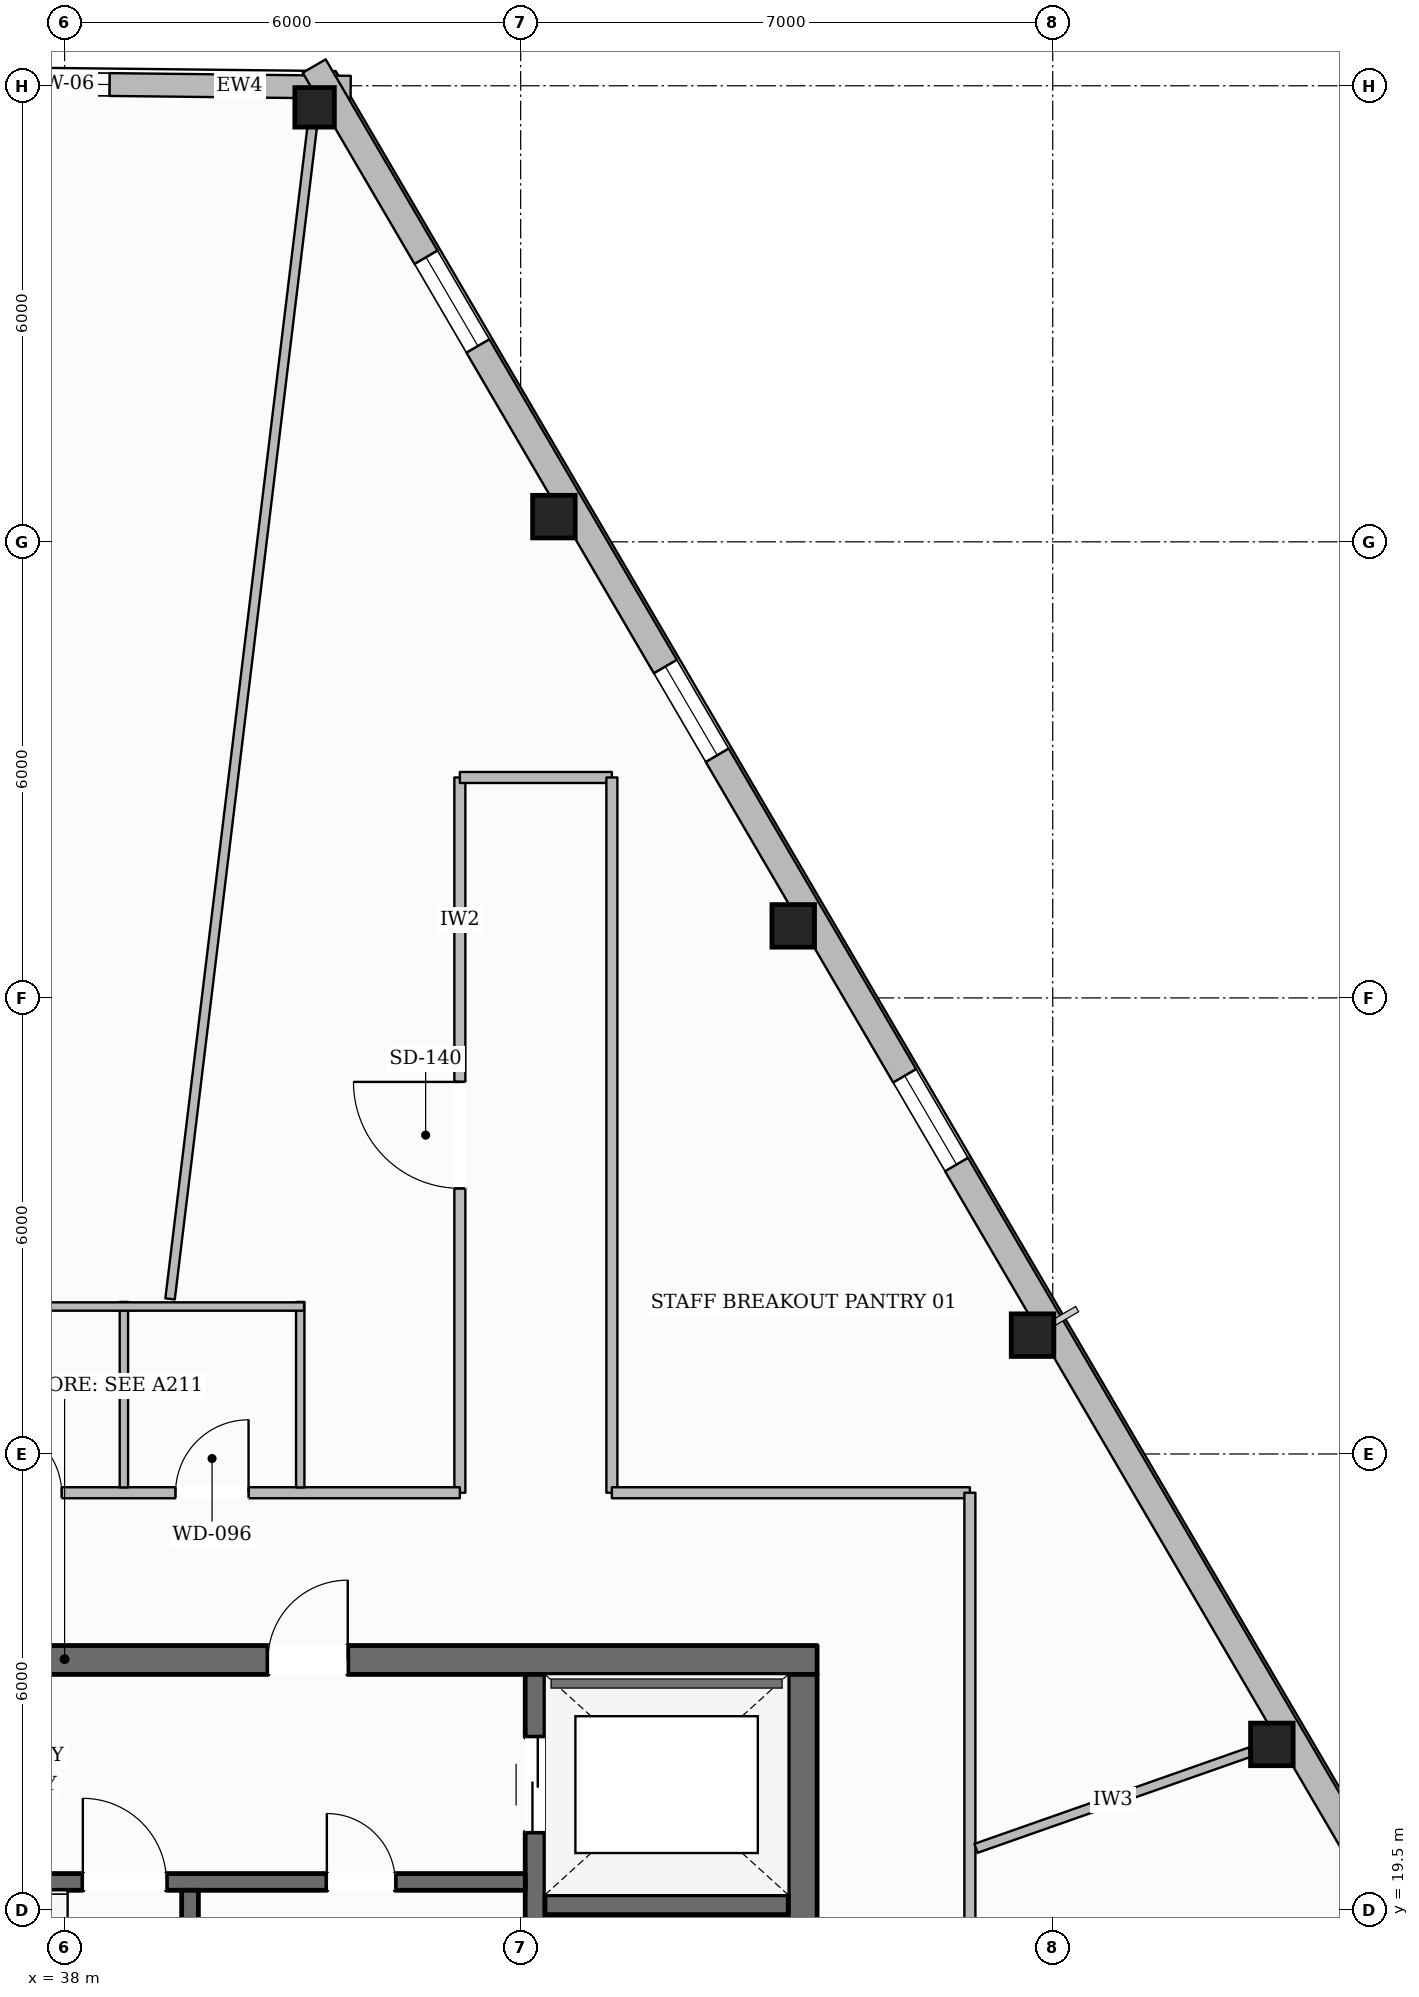
"""IFC4 building model, lengths in metres.
Left out: names, types, materials, properties, quantities, classifications, styles, units other than length and angle.
Written with IfcOpenShell. Run it as: python <this file> out.ifc"""

import sys

from ifc_helpers import new_model, si_unit, direction, frame, frame_2d, origin, origin_2d, place, context, subcontext, project, spatial, rectangle, hollow_rectangle, extrude, element, fill, save


model = new_model("IFC4")
c1 = context("Model", 3, precision=1e-05, world=origin(), true_north=direction((0.0, 1.0)))
c2 = subcontext(c1, "Body", "Model", "MODEL_VIEW")
j1 = project(units=[si_unit("LENGTHUNIT", "METRE"), si_unit("PLANEANGLEUNIT", "RADIAN")], contexts=[c1])
p1 = place(None, origin())
s1 = spatial("IfcSite", under=j1, at=p1, CompositionType="ELEMENT")
p2 = place(p1, origin())
s2 = spatial("IfcBuilding", under=s1, at=p2, CompositionType="ELEMENT")
p3 = place(p2, frame((0.0, 0.0, 254.9)))
s3 = spatial("IfcBuildingStorey", under=s2, at=p3, CompositionType="ELEMENT", Elevation=254.9)
p4 = place(p3, frame((28.1, 22.79, 0.0), z_axis=(0.0, 0.0, 1.0), x_axis=(1.0, 0.0, 0.0)))
e1 = element("IfcWall", 1, at=p4, inside=s3, PredefinedType="SOLIDWALL", context=c2, shape_type="SweptSolid", body=[
    extrude(rectangle(XDim=19.8, YDim=0.38, at=frame_2d((9.9, 0.0))), origin(), (0.0, 0.0, 1.0), 3.61),
])
p5 = place(p4, frame((6.175, 0.0, 0.0)))
e2 = element("IfcOpeningElement", 2, at=p5, cuts=e1, PredefinedType="OPENING", context=c2, shape_type="SweptSolid", body=[
    extrude(rectangle(XDim=1.05, YDim=2.15, at=frame_2d((0.525, 1.075))), frame((0.0, 0.2, 0.0), z_axis=(0.0, -1.0, 0.0), x_axis=(1.0, 0.0, 0.0)), (0.0, 0.0, 1.0), 0.4),
])
p6 = place(p4, frame((12.575, 0.0, 0.0)))
e3 = element("IfcOpeningElement", 3, at=p6, cuts=e1, PredefinedType="OPENING", context=c2, shape_type="SweptSolid", body=[
    extrude(rectangle(XDim=1.05, YDim=2.15, at=frame_2d((0.525, 1.075))), frame((0.0, 0.2, 0.0), z_axis=(0.0, -1.0, 0.0), x_axis=(1.0, 0.0, 0.0)), (0.0, 0.0, 1.0), 0.4),
])
p7 = place(p3, frame((47.71, 9.6, 0.0), z_axis=(0.0, 0.0, 1.0), x_axis=(0.0, 1.0, 0.0)))
e4 = element("IfcWall", 4, at=p7, inside=s3, PredefinedType="SOLIDWALL", context=c2, shape_type="SweptSolid", body=[
    extrude(rectangle(XDim=13.0, YDim=0.38, at=frame_2d((6.5, 0.0))), origin(), (0.0, 0.0, 1.0), 3.61),
])
p8 = place(p7, frame((0.2, 0.0, 0.0)))
e5 = element("IfcOpeningElement", 5, at=p8, cuts=e4, PredefinedType="OPENING", context=c2, shape_type="SweptSolid", body=[
    extrude(rectangle(XDim=1.1, YDim=2.15, at=frame_2d((0.55, 1.075))), frame((0.0, 0.2, 0.0), z_axis=(0.0, -1.0, 0.0), x_axis=(1.0, 0.0, 0.0)), (0.0, 0.0, 1.0), 0.4),
])
p9 = place(p7, frame((8.4, 0.0, 0.0)))
e6 = element("IfcOpeningElement", 6, at=p9, cuts=e4, PredefinedType="OPENING", context=c2, shape_type="SweptSolid", body=[
    extrude(rectangle(XDim=0.9, YDim=2.1, at=frame_2d((0.45, 1.05))), frame((0.0, 0.2, 0.0), z_axis=(0.0, -1.0, 0.0), x_axis=(1.0, 0.0, 0.0)), (0.0, 0.0, 1.0), 0.4),
])
p10 = place(p3, frame((44.19, 9.6, 0.0), z_axis=(0.0, 0.0, 1.0), x_axis=(0.0, 1.0, 0.0)))
e7 = element("IfcWall", 7, at=p10, inside=s3, PredefinedType="SHEAR", context=c2, shape_type="SweptSolid", body=[
    extrude(rectangle(XDim=13.0, YDim=0.26, at=frame_2d((6.5, 0.0))), origin(), (0.0, 0.0, 1.0), 3.61),
])
p11 = place(p10, frame((10.925, 0.0, 0.0)))
e8 = element("IfcOpeningElement", 8, at=p11, cuts=e7, PredefinedType="OPENING", context=c2, shape_type="SweptSolid", body=[
    extrude(rectangle(XDim=1.25, YDim=2.25, at=frame_2d((0.625, 1.125))), frame((0.0, 0.14, 0.0), z_axis=(0.0, -1.0, 0.0), x_axis=(1.0, 0.0, 0.0)), (0.0, 0.0, 1.0), 0.28),
])
p12 = place(p3, frame((44.32, 19.57, 0.0), z_axis=(0.0, 0.0, 1.0), x_axis=(1.0, 0.0, 0.0)))
e9 = element("IfcWall", 9, at=p12, inside=s3, PredefinedType="SHEAR", context=c2, shape_type="SweptSolid", body=[
    extrude(rectangle(XDim=3.2, YDim=0.26, at=frame_2d((1.6, 0.0))), origin(), (0.0, 0.0, 1.0), 3.61),
])
p13 = place(p3, frame((31.94, 19.87, 0.0), z_axis=(0.0, 0.0, 1.0), x_axis=(1.0, 0.0, 0.0)))
e10 = element("IfcWall", 10, at=p13, inside=s3, PredefinedType="SOLIDWALL", context=c2, shape_type="SweptSolid", body=[
    extrude(rectangle(XDim=12.12, YDim=0.22, at=frame_2d((6.06, 0.0))), origin(), (0.0, 0.0, 1.0), 3.61),
])
p14 = place(p13, frame((6.3, 0.0, 0.0)))
e11 = element("IfcOpeningElement", 11, at=p14, cuts=e10, PredefinedType="OPENING", context=c2, shape_type="SweptSolid", body=[
    extrude(rectangle(XDim=1.1, YDim=2.15, at=frame_2d((0.55, 1.075))), frame((0.0, 0.12, 0.0), z_axis=(0.0, -1.0, 0.0), x_axis=(1.0, 0.0, 0.0)), (0.0, 0.0, 1.0), 0.24),
])
p15 = place(p13, frame((9.51, 0.0, 0.0)))
e12 = element("IfcOpeningElement", 12, at=p15, cuts=e10, PredefinedType="OPENING", context=c2, shape_type="SweptSolid", body=[
    extrude(rectangle(XDim=0.9, YDim=2.1, at=frame_2d((0.45, 1.05))), frame((0.0, 0.12, 0.0), z_axis=(0.0, -1.0, 0.0), x_axis=(1.0, 0.0, 0.0)), (0.0, 0.0, 1.0), 0.24),
])
p16 = place(p3, frame((39.65, 16.56, 0.0), z_axis=(0.0, 0.0, 1.0), x_axis=(0.0, 1.0, 0.0)))
e13 = element("IfcWall", 13, at=p16, inside=s3, PredefinedType="SOLIDWALL", context=c2, shape_type="SweptSolid", body=[
    extrude(rectangle(XDim=3.2, YDim=0.22, at=frame_2d((1.6, 0.0))), origin(), (0.0, 0.0, 1.0), 3.61),
])
for number, where, z_axis, x_axis in (
    (14, (53.883, 21.679, 0.0), (0.0, 0.0, 1.0), (1.0, 0.0, 0.0)),
    (15, (50.734, 27.063, 0.0), (0.0, 0.0, 1.0), (1.0, 0.0, 0.0)),
    (16, (47.586, 32.448, 0.0), (0.0, 0.0, 1.0), (1.0, 0.0, 0.0)),
    (17, (44.437, 37.832, 0.0), (0.0, 0.0, 1.0), (1.0, 0.0, 0.0)),
):
    element("IfcColumn", number, at=place(p3, frame(where, z_axis=z_axis, x_axis=x_axis)), inside=s3, PredefinedType="COLUMN", context=c2, shape_type="SweptSolid", body=[
        extrude(hollow_rectangle(XDim=0.56, YDim=0.56, WallThickness=0.025, at=origin_2d()), origin(), (0.0, 0.0, 1.0), 3.61),
    ])
p17 = place(p3, frame((41.289, 43.216, 0.0), z_axis=(0.0, 0.0, 1.0), x_axis=(1.0, 0.0, 0.0)))
e18 = element("IfcColumn", 18, at=p17, inside=s3, PredefinedType="COLUMN", context=c2, shape_type="SweptSolid", body=[
    extrude(hollow_rectangle(XDim=0.52, YDim=0.52, WallThickness=0.024, at=origin_2d()), origin(), (0.0, 0.0, 1.0), 3.61),
])
p18 = place(p3, frame((34.367, 43.564, 0.0), z_axis=(0.0, 0.0, 1.0), x_axis=(0.999937028375, -0.011222267359, 0.0)))
e19 = element("IfcWall", 19, at=p18, inside=s3, PredefinedType="STANDARD", context=c2, shape_type="SweptSolid", body=[
    extrude(rectangle(XDim=7.397, YDim=0.3, at=frame_2d((3.698, 0.0))), origin(), (0.0, 0.0, 1.0), 3.196),
])
p19 = place(p18, frame((3.173, 0.0, 0.65)))
e20 = element("IfcOpeningElement", 20, at=p19, cuts=e19, PredefinedType="OPENING", context=c2, shape_type="SweptSolid", body=[
    extrude(rectangle(XDim=1.05, YDim=1.7, at=frame_2d((0.525, 0.85))), frame((0.0, 0.16, 0.0), z_axis=(0.0, -1.0, 0.0), x_axis=(1.0, 0.0, 0.0)), (0.0, 0.0, 1.0), 0.32),
])
p20 = place(p3, frame((41.284, 43.76, 0.0), z_axis=(0.0, 0.0, 1.0), x_axis=(0.50479404613, -0.863239810824, 0.0)))
e21 = element("IfcWall", 21, at=p20, inside=s3, PredefinedType="STANDARD", context=c2, shape_type="SweptSolid", body=[
    extrude(rectangle(XDim=38.372, YDim=0.35, at=frame_2d((19.186, 0.0))), origin(), (0.0, 0.0, 1.0), 3.196),
])
p21 = place(p20, frame((34.102, 0.0, 0.65)))
e22 = element("IfcOpeningElement", 22, at=p21, cuts=e21, PredefinedType="OPENING", context=c2, shape_type="SweptSolid", body=[
    extrude(rectangle(XDim=1.35, YDim=1.75, at=frame_2d((0.675, 0.875))), frame((0.0, 0.185, 0.0), z_axis=(0.0, -1.0, 0.0), x_axis=(1.0, 0.0, 0.0)), (0.0, 0.0, 1.0), 0.37),
])
p22 = place(p20, frame((27.864, 0.0, 0.65)))
e23 = element("IfcOpeningElement", 23, at=p22, cuts=e21, PredefinedType="OPENING", context=c2, shape_type="SweptSolid", body=[
    extrude(rectangle(XDim=1.35, YDim=1.75, at=frame_2d((0.675, 0.875))), frame((0.0, 0.185, 0.0), z_axis=(0.0, -1.0, 0.0), x_axis=(1.0, 0.0, 0.0)), (0.0, 0.0, 1.0), 0.37),
])
p23 = place(p20, frame((15.39, 0.0, 0.65)))
e24 = element("IfcOpeningElement", 24, at=p23, cuts=e21, PredefinedType="OPENING", context=c2, shape_type="SweptSolid", body=[
    extrude(rectangle(XDim=1.35, YDim=1.75, at=frame_2d((0.675, 0.875))), frame((0.0, 0.185, 0.0), z_axis=(0.0, -1.0, 0.0), x_axis=(1.0, 0.0, 0.0)), (0.0, 0.0, 1.0), 0.37),
])
p24 = place(p20, frame((9.153, 0.0, 0.65)))
e25 = element("IfcOpeningElement", 25, at=p24, cuts=e21, PredefinedType="OPENING", context=c2, shape_type="SweptSolid", body=[
    extrude(rectangle(XDim=1.35, YDim=1.75, at=frame_2d((0.675, 0.875))), frame((0.0, 0.185, 0.0), z_axis=(0.0, -1.0, 0.0), x_axis=(1.0, 0.0, 0.0)), (0.0, 0.0, 1.0), 0.37),
])
p25 = place(p20, frame((2.915, 0.0, 0.65)))
e26 = element("IfcOpeningElement", 26, at=p25, cuts=e21, PredefinedType="OPENING", context=c2, shape_type="SweptSolid", body=[
    extrude(rectangle(XDim=1.35, YDim=1.75, at=frame_2d((0.675, 0.875))), frame((0.0, 0.185, 0.0), z_axis=(0.0, -1.0, 0.0), x_axis=(1.0, 0.0, 0.0)), (0.0, 0.0, 1.0), 0.37),
])
p26 = place(p3, frame((43.2, 24.99, 0.0), z_axis=(0.0, 0.0, 1.0), x_axis=(0.0, 1.0, 0.0)))
e27 = element("IfcWall", 27, at=p26, inside=s3, PredefinedType="PARTITIONING", context=c2, shape_type="SweptSolid", body=[
    extrude(rectangle(XDim=9.41, YDim=0.145, at=frame_2d((4.705, 0.0))), origin(), (0.0, 0.0, 1.0), 3.61),
])
p27 = place(p26, frame((4.005, 0.0, 0.0)))
e28 = element("IfcOpeningElement", 28, at=p27, cuts=e27, PredefinedType="OPENING", context=c2, shape_type="SweptSolid", body=[
    extrude(rectangle(XDim=1.4, YDim=2.2, at=frame_2d((0.7, 1.1))), frame((0.0, 0.083, 0.0), z_axis=(0.0, -1.0, 0.0), x_axis=(1.0, 0.0, 0.0)), (0.0, 0.0, 1.0), 0.165),
])
p28 = place(p3, frame((43.2, 34.4, 0.0), z_axis=(0.0, 0.0, 1.0), x_axis=(1.0, 0.0, 0.0)))
e29 = element("IfcWall", 29, at=p28, inside=s3, PredefinedType="PARTITIONING", context=c2, shape_type="SweptSolid", body=[
    extrude(rectangle(XDim=2.0, YDim=0.145, at=frame_2d((1.0, 0.0))), origin(), (0.0, 0.0, 1.0), 3.61),
])
p29 = place(p3, frame((45.2, 34.4, 0.0), z_axis=(0.0, 0.0, 1.0), x_axis=(0.0, -1.0, 0.0)))
e30 = element("IfcWall", 30, at=p29, inside=s3, PredefinedType="PARTITIONING", context=c2, shape_type="SweptSolid", body=[
    extrude(rectangle(XDim=9.41, YDim=0.145, at=frame_2d((4.705, 0.0))), origin(), (0.0, 0.0, 1.0), 3.61),
])
p30 = place(p3, frame((45.2, 24.99, 0.0), z_axis=(0.0, 0.0, 1.0), x_axis=(1.0, 0.0, 0.0)))
e31 = element("IfcWall", 31, at=p30, inside=s3, PredefinedType="PARTITIONING", context=c2, shape_type="SweptSolid", body=[
    extrude(rectangle(XDim=4.71, YDim=0.145, at=frame_2d((2.355, 0.0))), origin(), (0.0, 0.0, 1.0), 3.61),
])
p31 = place(p3, frame((49.91, 24.99, 0.0), z_axis=(0.0, 0.0, 1.0), x_axis=(0.0, -1.0, 0.0)))
e32 = element("IfcWall", 32, at=p31, inside=s3, PredefinedType="PARTITIONING", context=c2, shape_type="SweptSolid", body=[
    extrude(rectangle(XDim=7.34, YDim=0.145, at=frame_2d((3.67, 0.0))), origin(), (0.0, 0.0, 1.0), 3.349),
])
p32 = place(p3, frame((26.09, 24.99, 0.0), z_axis=(0.0, 0.0, 1.0), x_axis=(1.0, 0.0, 0.0)))
e33 = element("IfcWall", 33, at=p32, inside=s3, PredefinedType="PARTITIONING", context=c2, shape_type="SweptSolid", body=[
    extrude(rectangle(XDim=17.11, YDim=0.145, at=frame_2d((8.555, 0.0))), origin(), (0.0, 0.0, 1.0), 3.61),
])
p33 = place(p32, frame((8.47, 0.0, 0.0)))
e34 = element("IfcOpeningElement", 34, at=p33, cuts=e33, PredefinedType="OPENING", context=c2, shape_type="SweptSolid", body=[
    extrude(rectangle(XDim=0.88, YDim=2.1, at=frame_2d((0.44, 1.05))), frame((0.0, 0.083, 0.0), z_axis=(0.0, -1.0, 0.0), x_axis=(1.0, 0.0, 0.0)), (0.0, 0.0, 1.0), 0.165),
])
p34 = place(p32, frame((10.99, 0.0, 0.0)))
e35 = element("IfcOpeningElement", 35, at=p34, cuts=e33, PredefinedType="OPENING", context=c2, shape_type="SweptSolid", body=[
    extrude(rectangle(XDim=0.88, YDim=2.1, at=frame_2d((0.44, 1.05))), frame((0.0, 0.083, 0.0), z_axis=(0.0, -1.0, 0.0), x_axis=(1.0, 0.0, 0.0)), (0.0, 0.0, 1.0), 0.165),
])
p35 = place(p32, frame((13.37, 0.0, 0.0)))
e36 = element("IfcOpeningElement", 36, at=p35, cuts=e33, PredefinedType="OPENING", context=c2, shape_type="SweptSolid", body=[
    extrude(rectangle(XDim=0.96, YDim=2.1, at=frame_2d((0.48, 1.05))), frame((0.0, 0.083, 0.0), z_axis=(0.0, -1.0, 0.0), x_axis=(1.0, 0.0, 0.0)), (0.0, 0.0, 1.0), 0.165),
])
p36 = place(p32, frame((4.257, 0.0, 0.0)))
e37 = element("IfcOpeningElement", 37, at=p36, cuts=e33, PredefinedType="OPENING", context=c2, shape_type="SweptSolid", body=[
    extrude(rectangle(XDim=1.4, YDim=2.2, at=frame_2d((0.7, 1.1))), frame((0.0, 0.083, 0.0), z_axis=(0.0, -1.0, 0.0), x_axis=(1.0, 0.0, 0.0)), (0.0, 0.0, 1.0), 0.165),
])
for number, where, z_axis, x_axis in (
    (38, (38.78, 25.06, 0.0), (0.0, 0.0, 1.0), (0.0, 1.0, 0.0)),
    (39, (41.1, 25.06, 0.0), (0.0, 0.0, 1.0), (0.0, 1.0, 0.0)),
):
    element("IfcWall", number, at=place(p3, frame(where, z_axis=z_axis, x_axis=x_axis)), inside=s3, PredefinedType="PLUMBINGWALL", context=c2, shape_type="SweptSolid", body=[
        extrude(rectangle(XDim=2.44, YDim=0.11, at=frame_2d((1.22, 0.0))), origin(), (0.0, 0.0, 1.0), 3.61),
    ])
p37 = place(p3, frame((33.69, 27.44, 0.0), z_axis=(0.0, 0.0, 1.0), x_axis=(1.0, 0.0, 0.0)))
e40 = element("IfcWall", 40, at=p37, inside=s3, PredefinedType="PLUMBINGWALL", context=c2, shape_type="SweptSolid", body=[
    extrude(rectangle(XDim=7.46, YDim=0.11, at=frame_2d((3.73, 0.0))), origin(), (0.0, 0.0, 1.0), 3.61),
])
p38 = place(p3, frame((49.99, 20.312, 0.0), z_axis=(0.0, 0.0, 1.0), x_axis=(0.943507124712, 0.331352237986, 0.0)))
e41 = element("IfcWall", 41, at=p38, inside=s3, PredefinedType="PARTITIONING", context=c2, shape_type="SweptSolid", body=[
    extrude(rectangle(XDim=3.82, YDim=0.125, at=frame_2d((1.91, 0.0))), origin(), (0.0, 0.0, 1.0), 3.61),
])
p39 = place(p3, frame((39.387, 27.54, 0.0), z_axis=(0.0, 0.0, 1.0), x_axis=(0.12041169592, 0.99272404196, 0.0)))
e42 = element("IfcWall", 42, at=p39, inside=s3, PredefinedType="PARTITIONING", context=c2, shape_type="SweptSolid", body=[
    extrude(rectangle(XDim=15.521, YDim=0.125, at=frame_2d((7.76, 0.0))), origin(), (0.0, 0.0, 1.0), 3.246),
])
p40 = place(p23, origin())
e43 = element("IfcWindow", 43, at=p40, inside=s3, PartitioningType="SINGLE_PANEL", PredefinedType="WINDOW", context=c2, shape_type="SweptSolid", body=[
    extrude(rectangle(XDim=1.35, YDim=1.75, at=frame_2d((0.675, 0.875))), frame((0.0, 0.03, 0.0), z_axis=(0.0, -1.0, 0.0), x_axis=(1.0, 0.0, 0.0)), (0.0, 0.0, 1.0), 0.06),
])
fill(e24, e43)
p41 = place(p24, origin())
e44 = element("IfcWindow", 44, at=p41, inside=s3, PartitioningType="SINGLE_PANEL", PredefinedType="WINDOW", context=c2, shape_type="SweptSolid", body=[
    extrude(rectangle(XDim=1.35, YDim=1.75, at=frame_2d((0.675, 0.875))), frame((0.0, 0.03, 0.0), z_axis=(0.0, -1.0, 0.0), x_axis=(1.0, 0.0, 0.0)), (0.0, 0.0, 1.0), 0.06),
])
fill(e25, e44)
p42 = place(p25, origin())
e45 = element("IfcWindow", 45, at=p42, inside=s3, PartitioningType="SINGLE_PANEL", PredefinedType="WINDOW", context=c2, shape_type="SweptSolid", body=[
    extrude(rectangle(XDim=1.35, YDim=1.75, at=frame_2d((0.675, 0.875))), frame((0.0, 0.03, 0.0), z_axis=(0.0, -1.0, 0.0), x_axis=(1.0, 0.0, 0.0)), (0.0, 0.0, 1.0), 0.06),
])
fill(e26, e45)
p43 = place(p19, origin())
e46 = element("IfcWindow", 46, at=p43, inside=s3, PartitioningType="SINGLE_PANEL", PredefinedType="WINDOW", context=c2, shape_type="SweptSolid", body=[
    extrude(rectangle(XDim=1.05, YDim=1.7, at=frame_2d((0.525, 0.85))), frame((0.0, 0.03, 0.0), z_axis=(0.0, -1.0, 0.0), x_axis=(1.0, 0.0, 0.0)), (0.0, 0.0, 1.0), 0.06),
])
fill(e20, e46)
p44 = place(p14, origin())
e47 = element("IfcDoor", 47, at=p44, inside=s3, OperationType="SINGLE_SWING_LEFT", PredefinedType="DOOR", context=c2, shape_type="SweptSolid", body=[
    extrude(rectangle(XDim=1.1, YDim=2.15, at=frame_2d((0.55, 1.075))), frame((0.0, 0.025, 0.0), z_axis=(0.0, -1.0, 0.0), x_axis=(1.0, 0.0, 0.0)), (0.0, 0.0, 1.0), 0.05),
])
fill(e11, e47)
p45 = place(p6, origin())
e48 = element("IfcDoor", 48, at=p45, inside=s3, OperationType="SINGLE_SWING_RIGHT", PredefinedType="DOOR", context=c2, shape_type="SweptSolid", body=[
    extrude(rectangle(XDim=1.05, YDim=2.15, at=frame_2d((0.525, 1.075))), frame((0.0, 0.025, 0.0), z_axis=(0.0, -1.0, 0.0), x_axis=(1.0, 0.0, 0.0)), (0.0, 0.0, 1.0), 0.05),
])
fill(e3, e48)
p46 = place(p11, origin())
e49 = element("IfcDoor", 49, at=p46, inside=s3, OperationType="DOUBLE_DOOR_SLIDING", PredefinedType="DOOR", context=c2, shape_type="SweptSolid", body=[
    extrude(rectangle(XDim=1.25, YDim=2.25, at=frame_2d((0.625, 1.125))), frame((0.0, 0.025, 0.0), z_axis=(0.0, -1.0, 0.0), x_axis=(1.0, 0.0, 0.0)), (0.0, 0.0, 1.0), 0.05),
])
fill(e8, e49)
p47 = place(p15, origin())
e50 = element("IfcDoor", 50, at=p47, inside=s3, OperationType="SINGLE_SWING_LEFT", PredefinedType="DOOR", context=c2, shape_type="SweptSolid", body=[
    extrude(rectangle(XDim=0.9, YDim=2.1, at=frame_2d((0.45, 1.05))), frame((0.0, 0.025, 0.0), z_axis=(0.0, -1.0, 0.0), x_axis=(1.0, 0.0, 0.0)), (0.0, 0.0, 1.0), 0.05),
])
fill(e12, e50)
p48 = place(p34, origin())
e51 = element("IfcDoor", 51, at=p48, inside=s3, OperationType="SINGLE_SWING_LEFT", PredefinedType="DOOR", context=c2, shape_type="SweptSolid", body=[
    extrude(rectangle(XDim=0.88, YDim=2.1, at=frame_2d((0.44, 1.05))), frame((0.0, 0.025, 0.0), z_axis=(0.0, -1.0, 0.0), x_axis=(1.0, 0.0, 0.0)), (0.0, 0.0, 1.0), 0.05),
])
fill(e35, e51)
p49 = place(p35, origin())
e52 = element("IfcDoor", 52, at=p49, inside=s3, OperationType="SINGLE_SWING_RIGHT", PredefinedType="DOOR", context=c2, shape_type="SweptSolid", body=[
    extrude(rectangle(XDim=0.96, YDim=2.1, at=frame_2d((0.48, 1.05))), frame((0.0, 0.025, 0.0), z_axis=(0.0, -1.0, 0.0), x_axis=(1.0, 0.0, 0.0)), (0.0, 0.0, 1.0), 0.05),
])
fill(e36, e52)
p50 = place(p27, origin())
e53 = element("IfcDoor", 53, at=p50, inside=s3, OperationType="SINGLE_SWING_RIGHT", PredefinedType="DOOR", context=c2, shape_type="SweptSolid", body=[
    extrude(rectangle(XDim=1.4, YDim=2.2, at=frame_2d((0.7, 1.1))), frame((0.0, 0.025, 0.0), z_axis=(0.0, -1.0, 0.0), x_axis=(1.0, 0.0, 0.0)), (0.0, 0.0, 1.0), 0.05),
])
fill(e28, e53)
save(model, sys.argv[1])
